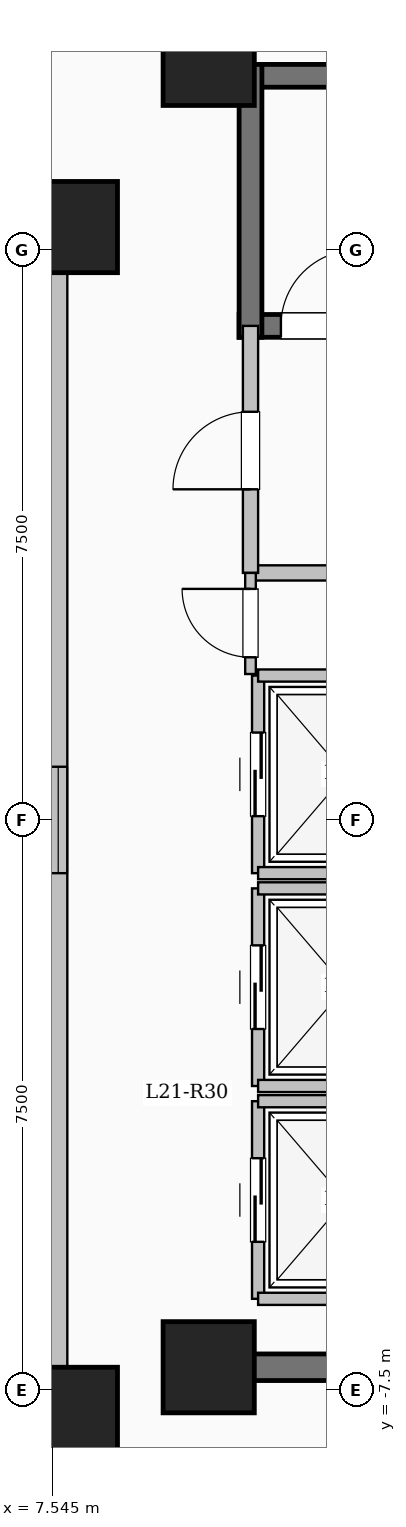
"""IFC4 building model, lengths in metres.
Left out: names, types, materials, properties, quantities, classifications, styles, units other than length and angle.
Written with IfcOpenShell. Run it as: python <this file> out.ifc"""

import sys

from ifc_helpers import new_model, si_unit, direction, frame, frame_2d, origin, origin_2d, place, context, subcontext, project, spatial, rectangle, extrude, element, fill, save


model = new_model("IFC4")
c1 = context("Model", 3, precision=1e-05, world=origin(), true_north=direction((0.0, 1.0)))
c2 = subcontext(c1, "Body", "Model", "MODEL_VIEW")
j1 = project(units=[si_unit("LENGTHUNIT", "METRE"), si_unit("PLANEANGLEUNIT", "RADIAN")], contexts=[c1])
p1 = place(None, origin())
s1 = spatial("IfcSite", under=j1, at=p1, CompositionType="ELEMENT")
p2 = place(p1, origin())
s2 = spatial("IfcBuilding", under=s1, at=p2, CompositionType="ELEMENT")
p3 = place(p2, frame((0.0, 0.0, 81.65)))
s3 = spatial("IfcBuildingStorey", under=s2, at=p3, CompositionType="ELEMENT", Elevation=81.65)
for number, where, z_axis, x_axis in (
    (1, (7.8, -7.8, 0.0), (0.0, 0.0, 1.0), (1.0, 0.0, 0.0)),
    (2, (7.8, 7.8, 0.0), (0.0, 0.0, 1.0), (1.0, 0.0, 0.0)),
    (3, (9.6, -7.2, 0.0), (0.0, 0.0, 1.0), (1.0, 0.0, 0.0)),
    (4, (9.6, 10.0, 0.0), (0.0, 0.0, 1.0), (1.0, 0.0, 0.0)),
):
    element("IfcColumn", number, at=place(p3, frame(where, z_axis=z_axis, x_axis=x_axis)), inside=s3, PredefinedType="COLUMN", context=c2, shape_type="SweptSolid", body=[
        extrude(rectangle(XDim=1.2, YDim=1.2, at=origin_2d()), origin(), (0.0, 0.0, 1.0), 3.35),
    ])
p4 = place(p3, frame((-7.62, -7.62, 0.0), z_axis=(0.0, 0.0, 1.0), x_axis=(1.0, 0.0, 0.0)))
e5 = element("IfcWall", 5, at=p4, inside=s3, PredefinedType="SOLIDWALL", context=c2, shape_type="SweptSolid", body=[
    extrude(rectangle(XDim=15.24, YDim=0.24, at=frame_2d((7.62, 0.0))), origin(), (0.0, 0.0, 1.0), 3.1),
])
p5 = place(p4, frame((6.92, 0.0, 0.95)))
e6 = element("IfcOpeningElement", 6, at=p5, cuts=e5, PredefinedType="OPENING", context=c2, shape_type="SweptSolid", body=[
    extrude(rectangle(XDim=1.4, YDim=1.5, at=frame_2d((0.7, 0.75))), frame((0.0, 0.13, 0.0), z_axis=(0.0, -1.0, 0.0), x_axis=(1.0, 0.0, 0.0)), (0.0, 0.0, 1.0), 0.26),
])
p6 = place(p3, frame((7.62, -7.62, 0.0), z_axis=(0.0, 0.0, 1.0), x_axis=(0.0, 1.0, 0.0)))
e7 = element("IfcWall", 7, at=p6, inside=s3, PredefinedType="SOLIDWALL", context=c2, shape_type="SweptSolid", body=[
    extrude(rectangle(XDim=15.24, YDim=0.24, at=frame_2d((7.62, 0.0))), origin(), (0.0, 0.0, 1.0), 3.1),
])
p7 = place(p6, frame((6.92, 0.0, 0.95)))
e8 = element("IfcOpeningElement", 8, at=p7, cuts=e7, PredefinedType="OPENING", context=c2, shape_type="SweptSolid", body=[
    extrude(rectangle(XDim=1.4, YDim=1.5, at=frame_2d((0.7, 0.75))), frame((0.0, 0.13, 0.0), z_axis=(0.0, -1.0, 0.0), x_axis=(1.0, 0.0, 0.0)), (0.0, 0.0, 1.0), 0.26),
])
p8 = place(p3, frame((7.62, 7.62, 0.0), z_axis=(0.0, 0.0, 1.0), x_axis=(-1.0, 0.0, 0.0)))
e9 = element("IfcWall", 9, at=p8, inside=s3, PredefinedType="SOLIDWALL", context=c2, shape_type="SweptSolid", body=[
    extrude(rectangle(XDim=15.24, YDim=0.24, at=frame_2d((7.62, 0.0))), origin(), (0.0, 0.0, 1.0), 3.1),
])
p9 = place(p8, frame((6.92, 0.0, 0.95)))
e10 = element("IfcOpeningElement", 10, at=p9, cuts=e9, PredefinedType="OPENING", context=c2, shape_type="SweptSolid", body=[
    extrude(rectangle(XDim=1.4, YDim=1.5, at=frame_2d((0.7, 0.75))), frame((0.0, 0.13, 0.0), z_axis=(0.0, -1.0, 0.0), x_axis=(1.0, 0.0, 0.0)), (0.0, 0.0, 1.0), 0.26),
])
p10 = place(p3, frame((10.0, 9.79, 0.0), z_axis=(0.0, 0.0, 1.0), x_axis=(1.0, 0.0, 0.0)))
e11 = element("IfcWall", 11, at=p10, inside=s3, PredefinedType="SHEAR", context=c2, shape_type="SweptSolid", body=[
    extrude(rectangle(XDim=8.0, YDim=0.3, at=frame_2d((4.0, 0.0))), origin(), (0.0, 0.0, 1.0), 3.35),
])
p11 = place(p3, frame((10.0, 6.5, 0.0), z_axis=(0.0, 0.0, 1.0), x_axis=(1.0, 0.0, 0.0)))
e12 = element("IfcWall", 12, at=p11, inside=s3, PredefinedType="SHEAR", context=c2, shape_type="SweptSolid", body=[
    extrude(rectangle(XDim=8.0, YDim=0.3, at=frame_2d((4.0, 0.0))), origin(), (0.0, 0.0, 1.0), 3.35),
])
p12 = place(p11, frame((0.55, 0.0, 0.0)))
e13 = element("IfcOpeningElement", 13, at=p12, cuts=e12, PredefinedType="OPENING", context=c2, shape_type="SweptSolid", body=[
    extrude(rectangle(XDim=1.0, YDim=2.15, at=frame_2d((0.5, 1.075))), frame((0.0, 0.16, 0.0), z_axis=(0.0, -1.0, 0.0), x_axis=(1.0, 0.0, 0.0)), (0.0, 0.0, 1.0), 0.32),
])
p13 = place(p3, frame((10.15, 6.35, 0.0), z_axis=(0.0, 0.0, 1.0), x_axis=(0.0, 1.0, 0.0)))
e14 = element("IfcWall", 14, at=p13, inside=s3, PredefinedType="SHEAR", context=c2, shape_type="SweptSolid", body=[
    extrude(rectangle(XDim=3.59, YDim=0.3, at=frame_2d((1.795, 0.0))), origin(), (0.0, 0.0, 1.0), 3.35),
])
p14 = place(p3, frame((10.15, 3.25, 0.0), z_axis=(0.0, 0.0, 1.0), x_axis=(1.0, 0.0, 0.0)))
e15 = element("IfcWall", 15, at=p14, inside=s3, PredefinedType="SOLIDWALL", context=c2, shape_type="SweptSolid", body=[
    extrude(rectangle(XDim=5.4, YDim=0.2, at=frame_2d((2.7, 0.0))), origin(), (0.0, 0.0, 1.0), 3.1),
])
p15 = place(p3, frame((10.15, 3.25, 0.0), z_axis=(0.0, 0.0, 1.0), x_axis=(0.0, 1.0, 0.0)))
e16 = element("IfcWall", 16, at=p15, inside=s3, PredefinedType="SOLIDWALL", context=c2, shape_type="SweptSolid", body=[
    extrude(rectangle(XDim=3.25, YDim=0.2, at=frame_2d((1.625, 0.0))), origin(), (0.0, 0.0, 1.0), 3.1),
])
p16 = place(p15, frame((1.1, 0.0, 0.0)))
e17 = element("IfcOpeningElement", 17, at=p16, cuts=e16, PredefinedType="OPENING", context=c2, shape_type="SweptSolid", body=[
    extrude(rectangle(XDim=1.02, YDim=2.15, at=frame_2d((0.51, 1.075))), frame((0.0, 0.11, 0.0), z_axis=(0.0, -1.0, 0.0), x_axis=(1.0, 0.0, 0.0)), (0.0, 0.0, 1.0), 0.22),
])
p17 = place(p3, frame((10.25, -6.3, 0.0), z_axis=(0.0, 0.0, 1.0), x_axis=(0.0, 1.0, 0.0)))
e18 = element("IfcWall", 18, at=p17, inside=s3, PredefinedType="SOLIDWALL", context=c2, shape_type="SweptSolid", body=[
    extrude(rectangle(XDim=2.6, YDim=0.16, at=frame_2d((1.3, 0.0))), origin(), (0.0, 0.0, 1.0), 3.1),
])
p18 = place(p17, frame((0.75, 0.0, 0.0)))
e19 = element("IfcOpeningElement", 19, at=p18, cuts=e18, PredefinedType="OPENING", context=c2, shape_type="SweptSolid", body=[
    extrude(rectangle(XDim=1.1, YDim=2.15, at=frame_2d((0.55, 1.075))), frame((0.0, 0.09, 0.0), z_axis=(0.0, -1.0, 0.0), x_axis=(1.0, 0.0, 0.0)), (0.0, 0.0, 1.0), 0.18),
])
for number, where, z_axis, x_axis in (
    (20, (10.25, -6.3, 0.0), (0.0, 0.0, 1.0), (1.0, 0.0, 0.0)),
    (21, (10.25, -3.7, 0.0), (0.0, 0.0, 1.0), (1.0, 0.0, 0.0)),
):
    element("IfcWall", number, at=place(p3, frame(where, z_axis=z_axis, x_axis=x_axis)), inside=s3, PredefinedType="SOLIDWALL", context=c2, shape_type="SweptSolid", body=[
        extrude(rectangle(XDim=2.3, YDim=0.16, at=frame_2d((1.15, 0.0))), origin(), (0.0, 0.0, 1.0), 3.1),
    ])
p19 = place(p3, frame((10.25, -3.5, 0.0), z_axis=(0.0, 0.0, 1.0), x_axis=(0.0, 1.0, 0.0)))
e22 = element("IfcWall", 22, at=p19, inside=s3, PredefinedType="SOLIDWALL", context=c2, shape_type="SweptSolid", body=[
    extrude(rectangle(XDim=2.6, YDim=0.16, at=frame_2d((1.3, 0.0))), origin(), (0.0, 0.0, 1.0), 3.1),
])
p20 = place(p19, frame((0.75, 0.0, 0.0)))
e23 = element("IfcOpeningElement", 23, at=p20, cuts=e22, PredefinedType="OPENING", context=c2, shape_type="SweptSolid", body=[
    extrude(rectangle(XDim=1.1, YDim=2.15, at=frame_2d((0.55, 1.075))), frame((0.0, 0.09, 0.0), z_axis=(0.0, -1.0, 0.0), x_axis=(1.0, 0.0, 0.0)), (0.0, 0.0, 1.0), 0.18),
])
for number, where, z_axis, x_axis in (
    (24, (10.25, -3.5, 0.0), (0.0, 0.0, 1.0), (1.0, 0.0, 0.0)),
    (25, (10.25, -0.9, 0.0), (0.0, 0.0, 1.0), (1.0, 0.0, 0.0)),
):
    element("IfcWall", number, at=place(p3, frame(where, z_axis=z_axis, x_axis=x_axis)), inside=s3, PredefinedType="SOLIDWALL", context=c2, shape_type="SweptSolid", body=[
        extrude(rectangle(XDim=2.3, YDim=0.16, at=frame_2d((1.15, 0.0))), origin(), (0.0, 0.0, 1.0), 3.1),
    ])
p21 = place(p3, frame((10.25, -0.7, 0.0), z_axis=(0.0, 0.0, 1.0), x_axis=(0.0, 1.0, 0.0)))
e26 = element("IfcWall", 26, at=p21, inside=s3, PredefinedType="SOLIDWALL", context=c2, shape_type="SweptSolid", body=[
    extrude(rectangle(XDim=2.6, YDim=0.16, at=frame_2d((1.3, 0.0))), origin(), (0.0, 0.0, 1.0), 3.1),
])
p22 = place(p21, frame((0.75, 0.0, 0.0)))
e27 = element("IfcOpeningElement", 27, at=p22, cuts=e26, PredefinedType="OPENING", context=c2, shape_type="SweptSolid", body=[
    extrude(rectangle(XDim=1.1, YDim=2.15, at=frame_2d((0.55, 1.075))), frame((0.0, 0.09, 0.0), z_axis=(0.0, -1.0, 0.0), x_axis=(1.0, 0.0, 0.0)), (0.0, 0.0, 1.0), 0.18),
])
for number, where, z_axis, x_axis in (
    (28, (10.25, -0.7, 0.0), (0.0, 0.0, 1.0), (1.0, 0.0, 0.0)),
    (29, (10.25, 1.9, 0.0), (0.0, 0.0, 1.0), (1.0, 0.0, 0.0)),
):
    element("IfcWall", number, at=place(p3, frame(where, z_axis=z_axis, x_axis=x_axis)), inside=s3, PredefinedType="SOLIDWALL", context=c2, shape_type="SweptSolid", body=[
        extrude(rectangle(XDim=2.3, YDim=0.16, at=frame_2d((1.15, 0.0))), origin(), (0.0, 0.0, 1.0), 3.1),
    ])
p23 = place(p3, frame((10.075, -7.2, 0.0), z_axis=(0.0, 0.0, 1.0), x_axis=(1.0, 0.0, 0.0)))
e30 = element("IfcWall", 30, at=p23, inside=s3, PredefinedType="SHEAR", context=c2, shape_type="SweptSolid", body=[
    extrude(rectangle(XDim=8.55, YDim=0.35, at=frame_2d((4.275, 0.0))), origin(), (0.0, 0.0, 1.0), 3.35),
])
p24 = place(p3, frame((10.15, 1.92, 0.0), z_axis=(0.0, 0.0, 1.0), x_axis=(0.0, 1.0, 0.0)))
e31 = element("IfcWall", 31, at=p24, inside=s3, PredefinedType="PARTITIONING", context=c2, shape_type="SweptSolid", body=[
    extrude(rectangle(XDim=1.33, YDim=0.14, at=frame_2d((0.665, 0.0))), origin(), (0.0, 0.0, 1.0), 3.1),
])
p25 = place(p24, frame((0.22, 0.0, 0.0)))
e32 = element("IfcOpeningElement", 32, at=p25, cuts=e31, PredefinedType="OPENING", context=c2, shape_type="SweptSolid", body=[
    extrude(rectangle(XDim=0.9, YDim=2.08, at=frame_2d((0.45, 1.04))), frame((0.0, 0.08, 0.0), z_axis=(0.0, -1.0, 0.0), x_axis=(1.0, 0.0, 0.0)), (0.0, 0.0, 1.0), 0.16),
])
p26 = place(p7, origin())
e33 = element("IfcWindow", 33, at=p26, inside=s3, PartitioningType="SINGLE_PANEL", PredefinedType="WINDOW", context=c2, shape_type="SweptSolid", body=[
    extrude(rectangle(XDim=1.4, YDim=1.5, at=frame_2d((0.7, 0.75))), frame((0.0, 0.03, 0.0), z_axis=(0.0, -1.0, 0.0), x_axis=(1.0, 0.0, 0.0)), (0.0, 0.0, 1.0), 0.06),
])
fill(e8, e33)
p27 = place(p12, origin())
e34 = element("IfcDoor", 34, at=p27, inside=s3, OperationType="SINGLE_SWING_RIGHT", PredefinedType="DOOR", context=c2, shape_type="SweptSolid", body=[
    extrude(rectangle(XDim=1.0, YDim=2.15, at=frame_2d((0.5, 1.075))), frame((0.0, 0.025, 0.0), z_axis=(0.0, -1.0, 0.0), x_axis=(1.0, 0.0, 0.0)), (0.0, 0.0, 1.0), 0.05),
])
fill(e13, e34)
p28 = place(p16, origin())
e35 = element("IfcDoor", 35, at=p28, inside=s3, OperationType="SINGLE_SWING_LEFT", PredefinedType="DOOR", context=c2, shape_type="SweptSolid", body=[
    extrude(rectangle(XDim=1.02, YDim=2.15, at=frame_2d((0.51, 1.075))), frame((0.0, 0.025, 0.0), z_axis=(0.0, -1.0, 0.0), x_axis=(1.0, 0.0, 0.0)), (0.0, 0.0, 1.0), 0.05),
])
fill(e17, e35)
p29 = place(p18, origin())
e36 = element("IfcDoor", 36, at=p29, inside=s3, OperationType="SLIDING_TO_LEFT", PredefinedType="DOOR", context=c2, shape_type="SweptSolid", body=[
    extrude(rectangle(XDim=1.1, YDim=2.15, at=frame_2d((0.55, 1.075))), frame((0.0, 0.025, 0.0), z_axis=(0.0, -1.0, 0.0), x_axis=(1.0, 0.0, 0.0)), (0.0, 0.0, 1.0), 0.05),
])
fill(e19, e36)
p30 = place(p20, origin())
e37 = element("IfcDoor", 37, at=p30, inside=s3, OperationType="SLIDING_TO_LEFT", PredefinedType="DOOR", context=c2, shape_type="SweptSolid", body=[
    extrude(rectangle(XDim=1.1, YDim=2.15, at=frame_2d((0.55, 1.075))), frame((0.0, 0.025, 0.0), z_axis=(0.0, -1.0, 0.0), x_axis=(1.0, 0.0, 0.0)), (0.0, 0.0, 1.0), 0.05),
])
fill(e23, e37)
p31 = place(p22, origin())
e38 = element("IfcDoor", 38, at=p31, inside=s3, OperationType="SLIDING_TO_LEFT", PredefinedType="DOOR", context=c2, shape_type="SweptSolid", body=[
    extrude(rectangle(XDim=1.1, YDim=2.15, at=frame_2d((0.55, 1.075))), frame((0.0, 0.025, 0.0), z_axis=(0.0, -1.0, 0.0), x_axis=(1.0, 0.0, 0.0)), (0.0, 0.0, 1.0), 0.05),
])
fill(e27, e38)
p32 = place(p25, origin())
e39 = element("IfcDoor", 39, at=p32, inside=s3, OperationType="SINGLE_SWING_RIGHT", PredefinedType="DOOR", context=c2, shape_type="SweptSolid", body=[
    extrude(rectangle(XDim=0.9, YDim=2.08, at=frame_2d((0.45, 1.04))), frame((0.0, 0.025, 0.0), z_axis=(0.0, -1.0, 0.0), x_axis=(1.0, 0.0, 0.0)), (0.0, 0.0, 1.0), 0.05),
])
fill(e32, e39)
save(model, sys.argv[1])
